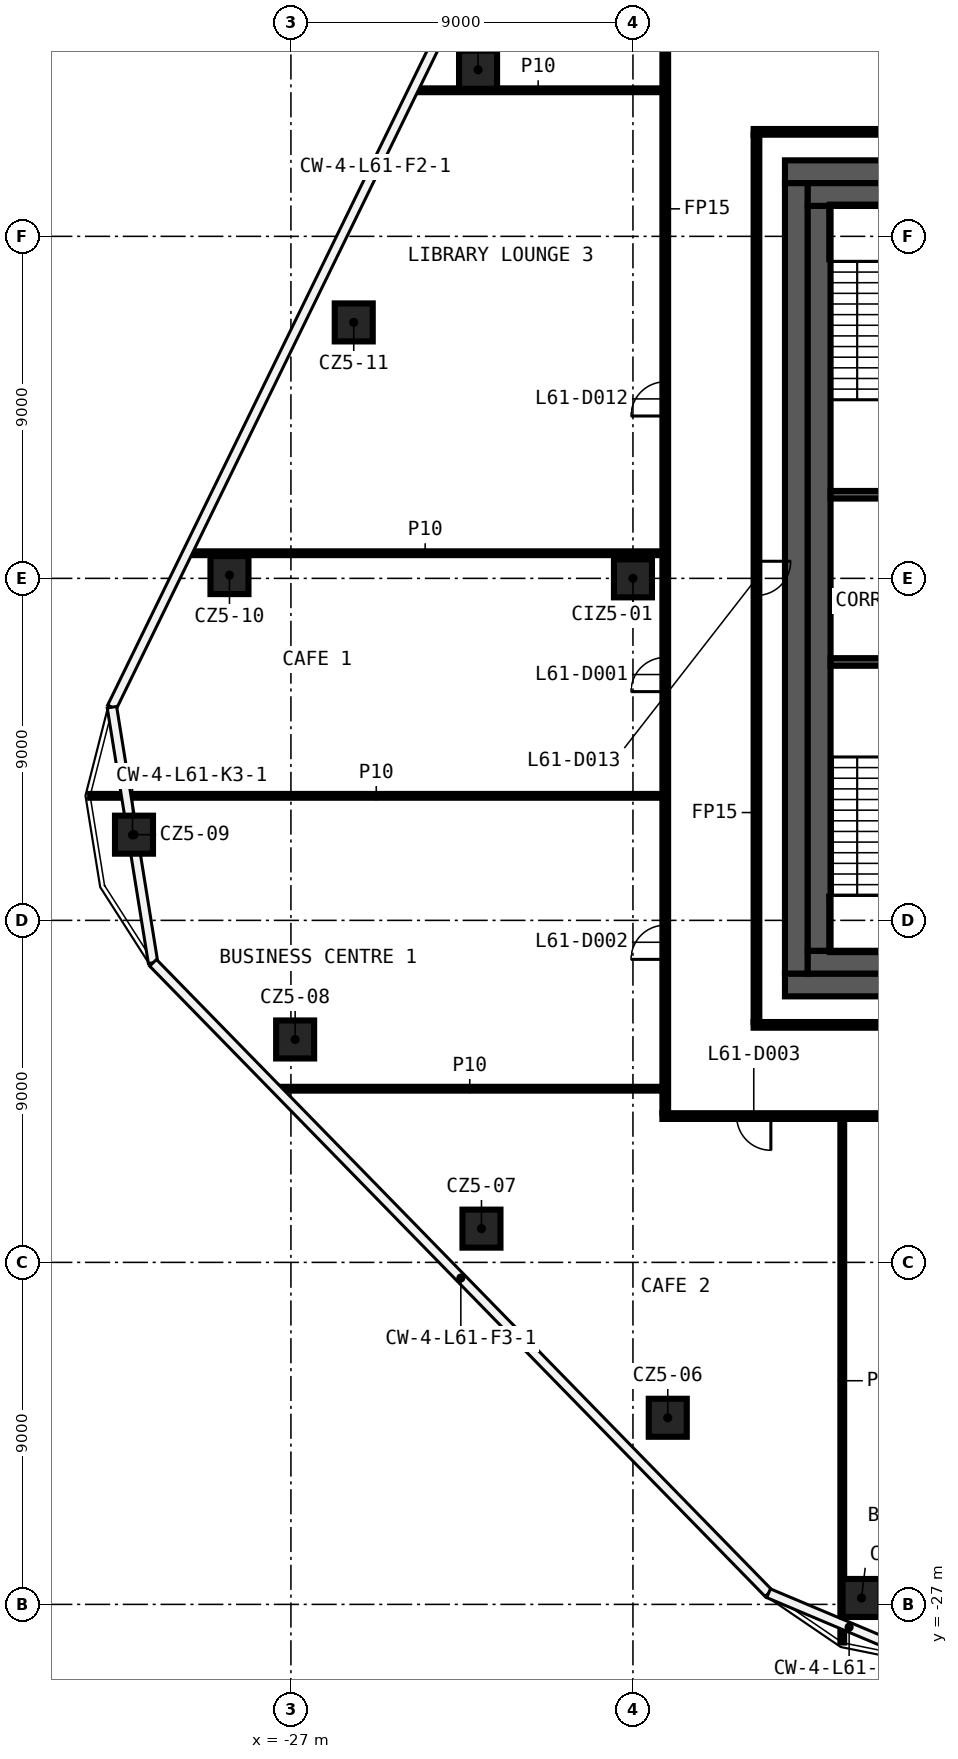
"""IFC4 building model, lengths in metres.
Left out: names, types, materials, properties, quantities, classifications, styles, units other than length and angle.
Written with IfcOpenShell. Run it as: python <this file> out.ifc"""

import sys

from ifc_helpers import new_model, si_unit, direction, frame, frame_2d, origin, origin_2d, place, context, subcontext, project, spatial, rectangle, extrude, element, fill, save


model = new_model("IFC4")
c1 = context("Model", 3, precision=1e-05, world=origin(), true_north=direction((0.0, 1.0)))
c2 = subcontext(c1, "Body", "Model", "MODEL_VIEW")
j1 = project(units=[si_unit("LENGTHUNIT", "METRE"), si_unit("PLANEANGLEUNIT", "RADIAN")], contexts=[c1])
p1 = place(None, origin())
s1 = spatial("IfcSite", under=j1, at=p1, CompositionType="ELEMENT")
p2 = place(p1, origin())
s2 = spatial("IfcBuilding", under=s1, at=p2, CompositionType="ELEMENT")
p3 = place(p2, frame((0.0, 0.0, 289.2)))
s3 = spatial("IfcBuildingStorey", under=s2, at=p3, CompositionType="ELEMENT", Elevation=289.2)
for number, where, z_axis, x_axis in (
    (1, (-11.985, -26.831, 0.0), (0.0, 0.0, 1.0), (1.0, 0.0, 0.0)),
    (2, (-17.084, -22.089, 0.0), (0.0, 0.0, 1.0), (1.0, 0.0, 0.0)),
    (3, (-21.986, -17.112, 0.0), (0.0, 0.0, 1.0), (1.0, 0.0, 0.0)),
    (4, (-26.889, -12.134, 0.0), (0.0, 0.0, 1.0), (1.0, 0.0, 0.0)),
    (5, (-31.129, -6.745, 0.0), (0.0, 0.0, 1.0), (1.0, 0.0, 0.0)),
    (6, (-28.617, 0.086, 0.0), (0.0, 0.0, 1.0), (1.0, 0.0, 0.0)),
    (7, (-25.347, 6.735, 0.0), (0.0, 0.0, 1.0), (1.0, 0.0, 0.0)),
    (8, (-22.076, 13.384, 0.0), (0.0, 0.0, 1.0), (1.0, 0.0, 0.0)),
    (9, (-18.0, 0.0, 0.0), (0.0, 0.0, 1.0), (1.0, 0.0, 0.0)),
):
    element("IfcColumn", number, at=place(p3, frame(where, z_axis=z_axis, x_axis=x_axis)), inside=s3, PredefinedType="COLUMN", context=c2, shape_type="SweptSolid", body=[
        extrude(rectangle(XDim=1.0, YDim=1.0, at=origin_2d()), origin(), (0.0, 0.0, 1.0), 4.62),
    ])
p4 = place(p3, frame((17.225, -14.15, 0.0), z_axis=(0.0, 0.0, 1.0), x_axis=(-1.0, 0.0, 0.0)))
e10 = element("IfcWall", 10, at=p4, inside=s3, PredefinedType="PARTITIONING", context=c2, shape_type="SweptSolid", body=[
    extrude(rectangle(XDim=34.45, YDim=0.15, at=frame_2d((17.225, 0.0))), origin(), (0.0, 0.0, 1.0), 4.62),
])
p5 = place(p4, frame((31.596, 0.0, 0.0)))
e11 = element("IfcOpeningElement", 11, at=p5, cuts=e10, PredefinedType="OPENING", context=c2, shape_type="SweptSolid", body=[
    extrude(rectangle(XDim=0.9, YDim=2.1, at=frame_2d((0.45, 1.05))), frame((0.0, 0.085, 0.0), z_axis=(0.0, -1.0, 0.0), x_axis=(1.0, 0.0, 0.0)), (0.0, 0.0, 1.0), 0.17),
])
p6 = place(p4, frame((25.832, 0.0, 0.0)))
e12 = element("IfcOpeningElement", 12, at=p6, cuts=e10, PredefinedType="OPENING", context=c2, shape_type="SweptSolid", body=[
    extrude(rectangle(XDim=0.9, YDim=2.1, at=frame_2d((0.45, 1.05))), frame((0.0, 0.085, 0.0), z_axis=(0.0, -1.0, 0.0), x_axis=(1.0, 0.0, 0.0)), (0.0, 0.0, 1.0), 0.17),
])
p7 = place(p4, frame((17.815, 0.0, 0.0)))
e13 = element("IfcOpeningElement", 13, at=p7, cuts=e10, PredefinedType="OPENING", context=c2, shape_type="SweptSolid", body=[
    extrude(rectangle(XDim=0.9, YDim=2.1, at=frame_2d((0.45, 1.05))), frame((0.0, 0.085, 0.0), z_axis=(0.0, -1.0, 0.0), x_axis=(1.0, 0.0, 0.0)), (0.0, 0.0, 1.0), 0.17),
])
p8 = place(p4, frame((4.344, 0.0, 0.0)))
e14 = element("IfcOpeningElement", 14, at=p8, cuts=e10, PredefinedType="OPENING", context=c2, shape_type="SweptSolid", body=[
    extrude(rectangle(XDim=0.9, YDim=2.1, at=frame_2d((0.45, 1.05))), frame((0.0, 0.085, 0.0), z_axis=(0.0, -1.0, 0.0), x_axis=(1.0, 0.0, 0.0)), (0.0, 0.0, 1.0), 0.17),
])
p9 = place(p3, frame((-27.364, -13.43, 0.0), z_axis=(0.0, 0.0, 1.0), x_axis=(1.0, 0.0, 0.0)))
e15 = element("IfcWall", 15, at=p9, inside=s3, PredefinedType="PARTITIONING", context=c2, shape_type="SweptSolid", body=[
    extrude(rectangle(XDim=10.139, YDim=0.1, at=frame_2d((5.069, 0.0))), origin(), (0.0, 0.0, 1.0), 4.62),
])
p10 = place(p3, frame((-14.825, -11.75, 0.0), z_axis=(0.0, 0.0, 1.0), x_axis=(1.0, 0.0, 0.0)))
e16 = element("IfcWall", 16, at=p10, inside=s3, PredefinedType="PARTITIONING", context=c2, shape_type="SweptSolid", body=[
    extrude(rectangle(XDim=22.025, YDim=0.15, at=frame_2d((11.012, 0.0))), origin(), (0.0, 0.0, 1.0), 4.62),
])
p11 = place(p3, frame((-32.283, -5.723, 0.0), z_axis=(0.0, 0.0, 1.0), x_axis=(1.0, 0.0, 0.0)))
e17 = element("IfcWall", 17, at=p11, inside=s3, PredefinedType="PARTITIONING", context=c2, shape_type="SweptSolid", body=[
    extrude(rectangle(XDim=15.058, YDim=0.1, at=frame_2d((7.529, 0.0))), origin(), (0.0, 0.0, 1.0), 4.62),
])
p12 = place(p3, frame((-29.71, 0.661, 0.0), z_axis=(0.0, 0.0, 1.0), x_axis=(1.0, 0.0, 0.0)))
e18 = element("IfcWall", 18, at=p12, inside=s3, PredefinedType="PARTITIONING", context=c2, shape_type="SweptSolid", body=[
    extrude(rectangle(XDim=12.485, YDim=0.1, at=frame_2d((6.242, 0.0))), origin(), (0.0, 0.0, 1.0), 4.62),
])
p13 = place(p3, frame((-14.825, 11.75, 0.0), z_axis=(0.0, 0.0, 1.0), x_axis=(1.0, 0.0, 0.0)))
e19 = element("IfcWall", 19, at=p13, inside=s3, PredefinedType="PARTITIONING", context=c2, shape_type="SweptSolid", body=[
    extrude(rectangle(XDim=16.625, YDim=0.15, at=frame_2d((8.312, 0.0))), origin(), (0.0, 0.0, 1.0), 4.62),
])
p14 = place(p3, frame((-23.763, 12.844, 0.0), z_axis=(0.0, 0.0, 1.0), x_axis=(1.0, 0.0, 0.0)))
e20 = element("IfcWall", 20, at=p14, inside=s3, PredefinedType="PARTITIONING", context=c2, shape_type="SweptSolid", body=[
    extrude(rectangle(XDim=6.538, YDim=0.1, at=frame_2d((3.269, 0.0))), origin(), (0.0, 0.0, 1.0), 4.62),
])
p15 = place(p3, frame((-12.492, -28.004, 0.0), z_axis=(0.0, 0.0, 1.0), x_axis=(0.0, 1.0, 0.0)))
e21 = element("IfcWall", 21, at=p15, inside=s3, PredefinedType="PARTITIONING", context=c2, shape_type="SweptSolid", body=[
    extrude(rectangle(XDim=13.779, YDim=0.1, at=frame_2d((6.889, 0.0))), origin(), (0.0, 0.0, 1.0), 4.62),
])
p16 = place(p3, frame((-14.75, 11.675, 0.0), z_axis=(0.0, 0.0, 1.0), x_axis=(0.0, -1.0, 0.0)))
e22 = element("IfcWall", 22, at=p16, inside=s3, PredefinedType="PARTITIONING", context=c2, shape_type="SweptSolid", body=[
    extrude(rectangle(XDim=23.35, YDim=0.15, at=frame_2d((11.675, 0.0))), origin(), (0.0, 0.0, 1.0), 4.62),
])
p17 = place(p16, frame((11.225, 0.0, 0.0)))
e23 = element("IfcOpeningElement", 23, at=p17, cuts=e22, PredefinedType="OPENING", context=c2, shape_type="SweptSolid", body=[
    extrude(rectangle(XDim=0.9, YDim=2.1, at=frame_2d((0.45, 1.05))), frame((0.0, 0.085, 0.0), z_axis=(0.0, -1.0, 0.0), x_axis=(1.0, 0.0, 0.0)), (0.0, 0.0, 1.0), 0.17),
])
p18 = place(p3, frame((-17.15, -14.075, 0.0), z_axis=(0.0, 0.0, 1.0), x_axis=(0.0, 1.0, 0.0)))
e24 = element("IfcWall", 24, at=p18, inside=s3, PredefinedType="PARTITIONING", context=c2, shape_type="SweptSolid", body=[
    extrude(rectangle(XDim=28.15, YDim=0.15, at=frame_2d((14.075, 0.0))), origin(), (0.0, 0.0, 1.0), 4.62),
])
p19 = place(p18, frame((11.094, 0.0, 0.0)))
e25 = element("IfcOpeningElement", 25, at=p19, cuts=e24, PredefinedType="OPENING", context=c2, shape_type="SweptSolid", body=[
    extrude(rectangle(XDim=0.9, YDim=2.1, at=frame_2d((0.45, 1.05))), frame((0.0, 0.085, 0.0), z_axis=(0.0, -1.0, 0.0), x_axis=(1.0, 0.0, 0.0)), (0.0, 0.0, 1.0), 0.17),
])
p20 = place(p18, frame((4.049, 0.0, 0.0)))
e26 = element("IfcOpeningElement", 26, at=p20, cuts=e24, PredefinedType="OPENING", context=c2, shape_type="SweptSolid", body=[
    extrude(rectangle(XDim=0.9, YDim=2.1, at=frame_2d((0.45, 1.05))), frame((0.0, 0.085, 0.0), z_axis=(0.0, -1.0, 0.0), x_axis=(1.0, 0.0, 0.0)), (0.0, 0.0, 1.0), 0.17),
])
p21 = place(p18, frame((18.347, 0.0, 0.0)))
e27 = element("IfcOpeningElement", 27, at=p21, cuts=e24, PredefinedType="OPENING", context=c2, shape_type="SweptSolid", body=[
    extrude(rectangle(XDim=0.9, YDim=2.1, at=frame_2d((0.45, 1.05))), frame((0.0, 0.085, 0.0), z_axis=(0.0, -1.0, 0.0), x_axis=(1.0, 0.0, 0.0)), (0.0, 0.0, 1.0), 0.17),
])
p22 = place(p3, frame((-14.0, 10.7, 0.0), z_axis=(0.0, 0.0, 1.0), x_axis=(1.0, 0.0, 0.0)))
e28 = element("IfcWall", 28, at=p22, inside=s3, PredefinedType="SHEAR", context=c2, shape_type="SweptSolid", body=[
    extrude(rectangle(XDim=28.0, YDim=0.6, at=frame_2d((14.0, 0.0))), origin(), (0.0, 0.0, 1.0), 4.62),
])
p23 = place(p22, frame((15.9, 0.0, 0.0)))
e29 = element("IfcOpeningElement", 29, at=p23, cuts=e28, PredefinedType="OPENING", context=c2, shape_type="SweptSolid", body=[
    extrude(rectangle(XDim=1.6, YDim=2.1, at=frame_2d((0.8, 1.05))), frame((0.0, 0.31, 0.0), z_axis=(0.0, -1.0, 0.0), x_axis=(1.0, 0.0, 0.0)), (0.0, 0.0, 1.0), 0.62),
])
p24 = place(p3, frame((14.0, -10.7, 0.0), z_axis=(0.0, 0.0, 1.0), x_axis=(-1.0, 0.0, 0.0)))
e30 = element("IfcWall", 30, at=p24, inside=s3, PredefinedType="SHEAR", context=c2, shape_type="SweptSolid", body=[
    extrude(rectangle(XDim=28.0, YDim=0.6, at=frame_2d((14.0, 0.0))), origin(), (0.0, 0.0, 1.0), 4.62),
])
p25 = place(p24, frame((5.1, 0.0, 0.0)))
e31 = element("IfcOpeningElement", 31, at=p25, cuts=e30, PredefinedType="OPENING", context=c2, shape_type="SweptSolid", body=[
    extrude(rectangle(XDim=1.6, YDim=2.1, at=frame_2d((0.8, 1.05))), frame((0.0, 0.31, 0.0), z_axis=(0.0, -1.0, 0.0), x_axis=(1.0, 0.0, 0.0)), (0.0, 0.0, 1.0), 0.62),
])
p26 = place(p3, frame((-13.7, -10.4, 0.0), z_axis=(0.0, 0.0, 1.0), x_axis=(0.0, 1.0, 0.0)))
e32 = element("IfcWall", 32, at=p26, inside=s3, PredefinedType="SHEAR", context=c2, shape_type="SweptSolid", body=[
    extrude(rectangle(XDim=20.8, YDim=0.6, at=frame_2d((10.4, 0.0))), origin(), (0.0, 0.0, 1.0), 4.62),
])
p27 = place(p3, frame((-13.4, 10.1, 0.0), z_axis=(0.0, 0.0, 1.0), x_axis=(1.0, 0.0, 0.0)))
e33 = element("IfcWall", 33, at=p27, inside=s3, PredefinedType="SHEAR", context=c2, shape_type="SweptSolid", body=[
    extrude(rectangle(XDim=14.9, YDim=0.6, at=frame_2d((7.45, 0.0))), origin(), (0.0, 0.0, 1.0), 4.62),
])
p28 = place(p3, frame((6.9, -10.1, 0.0), z_axis=(0.0, 0.0, 1.0), x_axis=(-1.0, 0.0, 0.0)))
e34 = element("IfcWall", 34, at=p28, inside=s3, PredefinedType="SHEAR", context=c2, shape_type="SweptSolid", body=[
    extrude(rectangle(XDim=20.3, YDim=0.6, at=frame_2d((10.15, 0.0))), origin(), (0.0, 0.0, 1.0), 4.62),
])
p29 = place(p3, frame((-13.1, -9.8, 0.0), z_axis=(0.0, 0.0, 1.0), x_axis=(0.0, 1.0, 0.0)))
e35 = element("IfcWall", 35, at=p29, inside=s3, PredefinedType="SHEAR", context=c2, shape_type="SweptSolid", body=[
    extrude(rectangle(XDim=19.6, YDim=0.6, at=frame_2d((9.8, 0.0))), origin(), (0.0, 0.0, 1.0), 4.62),
])
for number, where, z_axis, x_axis in (
    (36, (-9.45, 2.2, 0.0), (0.0, 0.0, 1.0), (-1.0, 0.0, 0.0)),
    (37, (-9.45, -2.2, 0.0), (0.0, 0.0, 1.0), (-1.0, 0.0, 0.0)),
):
    element("IfcWall", number, at=place(p3, frame(where, z_axis=z_axis, x_axis=x_axis)), inside=s3, PredefinedType="SHEAR", context=c2, shape_type="SweptSolid", body=[
        extrude(rectangle(XDim=3.35, YDim=0.2, at=frame_2d((1.675, 0.0))), origin(), (0.0, 0.0, 1.0), 4.62),
    ])
p30 = place(p19, origin())
e38 = element("IfcDoor", 38, at=p30, inside=s3, OperationType="SINGLE_SWING_RIGHT", PredefinedType="DOOR", context=c2, shape_type="SweptSolid", body=[
    extrude(rectangle(XDim=0.9, YDim=2.1, at=frame_2d((0.45, 1.05))), frame((0.0, 0.025, 0.0), z_axis=(0.0, -1.0, 0.0), x_axis=(1.0, 0.0, 0.0)), (0.0, 0.0, 1.0), 0.05),
])
fill(e25, e38)
p31 = place(p20, origin())
e39 = element("IfcDoor", 39, at=p31, inside=s3, OperationType="SINGLE_SWING_LEFT", PredefinedType="DOOR", context=c2, shape_type="SweptSolid", body=[
    extrude(rectangle(XDim=0.9, YDim=2.1, at=frame_2d((0.45, 1.05))), frame((0.0, 0.025, 0.0), z_axis=(0.0, -1.0, 0.0), x_axis=(1.0, 0.0, 0.0)), (0.0, 0.0, 1.0), 0.05),
])
fill(e26, e39)
p32 = place(p5, origin())
e40 = element("IfcDoor", 40, at=p32, inside=s3, OperationType="SINGLE_SWING_RIGHT", PredefinedType="DOOR", context=c2, shape_type="SweptSolid", body=[
    extrude(rectangle(XDim=0.9, YDim=2.1, at=frame_2d((0.45, 1.05))), frame((0.0, 0.025, 0.0), z_axis=(0.0, -1.0, 0.0), x_axis=(1.0, 0.0, 0.0)), (0.0, 0.0, 1.0), 0.05),
])
fill(e11, e40)
p33 = place(p21, origin())
e41 = element("IfcDoor", 41, at=p33, inside=s3, OperationType="SINGLE_SWING_LEFT", PredefinedType="DOOR", context=c2, shape_type="SweptSolid", body=[
    extrude(rectangle(XDim=0.9, YDim=2.1, at=frame_2d((0.45, 1.05))), frame((0.0, 0.025, 0.0), z_axis=(0.0, -1.0, 0.0), x_axis=(1.0, 0.0, 0.0)), (0.0, 0.0, 1.0), 0.05),
])
fill(e27, e41)
p34 = place(p17, origin())
e42 = element("IfcDoor", 42, at=p34, inside=s3, OperationType="SINGLE_SWING_RIGHT", PredefinedType="DOOR", context=c2, shape_type="SweptSolid", body=[
    extrude(rectangle(XDim=0.9, YDim=2.1, at=frame_2d((0.45, 1.05))), frame((0.0, 0.025, 0.0), z_axis=(0.0, -1.0, 0.0), x_axis=(1.0, 0.0, 0.0)), (0.0, 0.0, 1.0), 0.05),
])
fill(e23, e42)
save(model, sys.argv[1])
